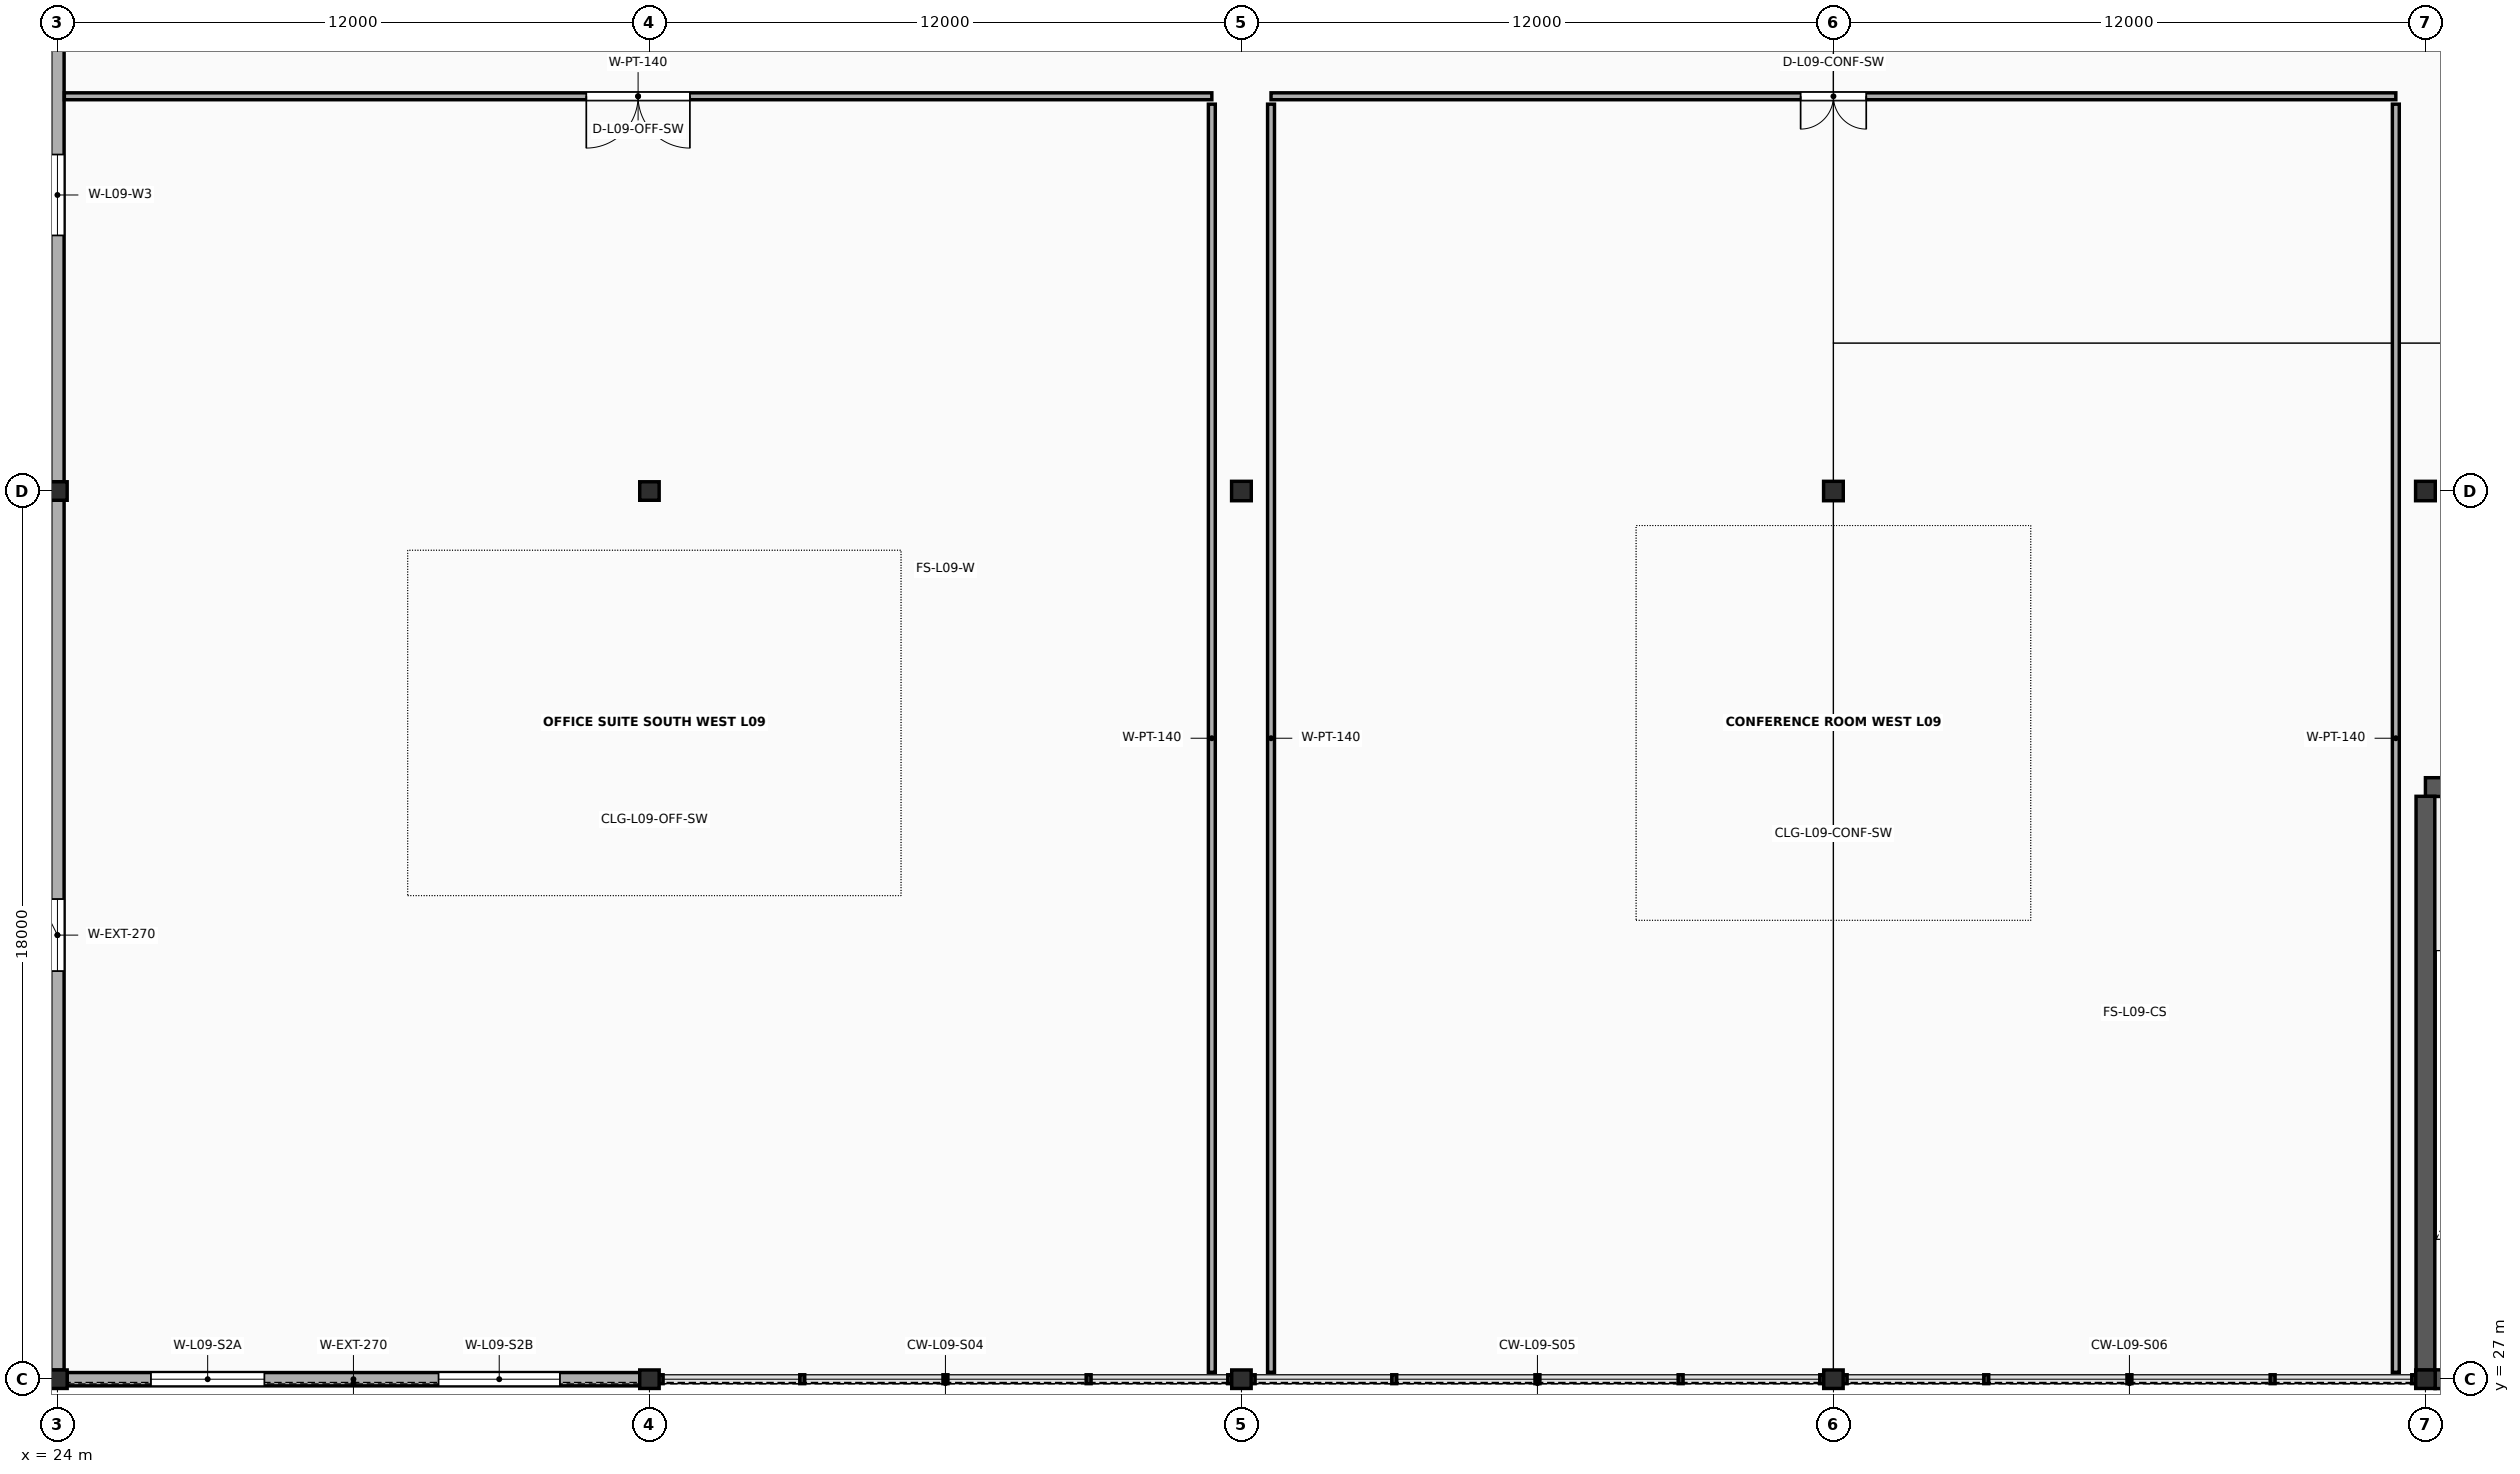
"""IFC4 building model, lengths in metres.
Left out: names, types, materials, properties, quantities, classifications, styles, units other than length and angle.
Written with IfcOpenShell. Run it as: python <this file> out.ifc"""

import sys

from ifc_helpers import new_model, si_unit, direction, frame, frame_2d, origin, origin_2d, place, context, subcontext, project, spatial, rectangle, i_section, extrude, element, fill, save


model = new_model("IFC4")
c1 = context("Model", 3, precision=1e-05, world=origin(), true_north=direction((0.0, 1.0)))
c2 = subcontext(c1, "Body", "Model", "MODEL_VIEW")
j1 = project(units=[si_unit("LENGTHUNIT", "METRE"), si_unit("PLANEANGLEUNIT", "RADIAN")], contexts=[c1])
p1 = place(None, origin())
s1 = spatial("IfcSite", under=j1, at=p1, CompositionType="ELEMENT")
p2 = place(p1, origin())
s2 = spatial("IfcBuilding", under=s1, at=p2, CompositionType="ELEMENT")
p3 = place(p2, frame((0.0, 0.0, 37.6)))
s3 = spatial("IfcBuildingStorey", under=s2, at=p3, CompositionType="ELEMENT", Elevation=37.6)
for number, where, z_axis, x_axis in (
    (1, (24.0, 27.0, 0.0), (0.0, 0.0, 1.0), (1.0, 0.0, 0.0)),
    (2, (24.0, 45.0, 0.0), (0.0, 0.0, 1.0), (1.0, 0.0, 0.0)),
    (3, (36.0, 27.0, 0.0), (0.0, 0.0, 1.0), (1.0, 0.0, 0.0)),
    (4, (36.0, 45.0, 0.0), (0.0, 0.0, 1.0), (1.0, 0.0, 0.0)),
    (5, (48.0, 27.0, 0.0), (0.0, 0.0, 1.0), (1.0, 0.0, 0.0)),
):
    element("IfcColumn", number, at=place(p3, frame(where, z_axis=z_axis, x_axis=x_axis)), inside=s3, PredefinedType="COLUMN", context=c2, shape_type="SweptSolid", body=[
        extrude(i_section(OverallWidth=0.394, OverallDepth=0.375, WebThickness=0.017, FlangeThickness=0.028, FilletRadius=0.018, at=origin_2d()), origin(), (0.0, 0.0, 1.0), 4.0),
    ])
p4 = place(p3, frame((48.0, 45.0, 0.0), z_axis=(0.0, 0.0, 1.0), x_axis=(1.0, 0.0, 0.0)))
e6 = element("IfcColumn", 6, at=p4, inside=s3, PredefinedType="COLUMN", context=c2, shape_type="SweptSolid", body=[
    extrude(i_section(OverallWidth=0.399, OverallDepth=0.393, WebThickness=0.023, FlangeThickness=0.037, FilletRadius=0.018, at=origin_2d()), origin(), (0.0, 0.0, 1.0), 4.0),
])
p5 = place(p3, frame((60.0, 27.0, 0.0), z_axis=(0.0, 0.0, 1.0), x_axis=(1.0, 0.0, 0.0)))
e7 = element("IfcColumn", 7, at=p5, inside=s3, PredefinedType="COLUMN", context=c2, shape_type="SweptSolid", body=[
    extrude(i_section(OverallWidth=0.394, OverallDepth=0.375, WebThickness=0.017, FlangeThickness=0.028, FilletRadius=0.018, at=origin_2d()), origin(), (0.0, 0.0, 1.0), 4.0),
])
p6 = place(p3, frame((60.0, 45.0, 0.0), z_axis=(0.0, 0.0, 1.0), x_axis=(1.0, 0.0, 0.0)))
e8 = element("IfcColumn", 8, at=p6, inside=s3, PredefinedType="COLUMN", context=c2, shape_type="SweptSolid", body=[
    extrude(i_section(OverallWidth=0.399, OverallDepth=0.393, WebThickness=0.023, FlangeThickness=0.037, FilletRadius=0.018, at=origin_2d()), origin(), (0.0, 0.0, 1.0), 4.0),
])
p7 = place(p3, frame((72.0, 27.0, 0.0), z_axis=(0.0, 0.0, 1.0), x_axis=(1.0, 0.0, 0.0)))
e9 = element("IfcColumn", 9, at=p7, inside=s3, PredefinedType="COLUMN", context=c2, shape_type="SweptSolid", body=[
    extrude(i_section(OverallWidth=0.394, OverallDepth=0.375, WebThickness=0.017, FlangeThickness=0.028, FilletRadius=0.018, at=origin_2d()), origin(), (0.0, 0.0, 1.0), 4.0),
])
p8 = place(p3, frame((72.0, 45.0, 0.0), z_axis=(0.0, 0.0, 1.0), x_axis=(1.0, 0.0, 0.0)))
e10 = element("IfcColumn", 10, at=p8, inside=s3, PredefinedType="COLUMN", context=c2, shape_type="SweptSolid", body=[
    extrude(i_section(OverallWidth=0.399, OverallDepth=0.393, WebThickness=0.023, FlangeThickness=0.037, FilletRadius=0.018, at=origin_2d()), origin(), (0.0, 0.0, 1.0), 4.0),
])
p9 = place(p3, frame((72.194, 27.0, 0.0), z_axis=(0.0, 0.0, 1.0), x_axis=(1.0, 0.0, 0.0)))
e11 = element("IfcWall", 11, at=p9, inside=s3, PredefinedType="SHEAR", context=c2, shape_type="SweptSolid", body=[
    extrude(rectangle(XDim=11.612, YDim=0.38, at=frame_2d((5.806, 0.0))), origin(), (0.0, 0.0, 1.0), 3.838),
])
p10 = place(p3, frame((72.0, 39.0, 0.0), z_axis=(0.0, 0.0, 1.0), x_axis=(1.0, 0.0, 0.0)))
e12 = element("IfcWall", 12, at=p10, inside=s3, PredefinedType="SHEAR", context=c2, shape_type="SweptSolid", body=[
    extrude(rectangle(XDim=12.0, YDim=0.38, at=frame_2d((6.0, 0.0))), origin(), (0.0, 0.0, 1.0), 3.838),
])
p11 = place(p10, frame((7.45, 0.0, 0.0)))
e13 = element("IfcOpeningElement", 13, at=p11, cuts=e12, PredefinedType="OPENING", context=c2, shape_type="SweptSolid", body=[
    extrude(rectangle(XDim=1.5, YDim=2.25, at=frame_2d((0.75, 1.125))), frame((0.0, 0.205, 0.0), z_axis=(0.0, -1.0, 0.0), x_axis=(1.0, 0.0, 0.0)), (0.0, 0.0, 1.0), 0.41),
])
p12 = place(p3, frame((72.0, 27.185, 0.0), z_axis=(0.0, 0.0, 1.0), x_axis=(0.0, 1.0, 0.0)))
e14 = element("IfcWall", 14, at=p12, inside=s3, PredefinedType="SHEAR", context=c2, shape_type="SweptSolid", body=[
    extrude(rectangle(XDim=11.628, YDim=0.38, at=frame_2d((5.814, 0.0))), origin(), (0.0, 0.0, 1.0), 3.838),
])
p13 = place(p3, frame((24.195, 27.0, 0.0), z_axis=(0.0, 0.0, 1.0), x_axis=(1.0, 0.0, 0.0)))
e15 = element("IfcWall", 15, at=p13, inside=s3, PredefinedType="SOLIDWALL", context=c2, shape_type="SweptSolid", body=[
    extrude(rectangle(XDim=11.61, YDim=0.27, at=frame_2d((5.805, 0.0))), origin(), (0.0, 0.0, 1.0), 3.291),
])
p14 = place(p13, frame((1.7, 0.0, 0.78)))
e16 = element("IfcOpeningElement", 16, at=p14, cuts=e15, PredefinedType="OPENING", context=c2, shape_type="SweptSolid", body=[
    extrude(rectangle(XDim=2.3, YDim=1.58, at=frame_2d((1.15, 0.79))), frame((0.0, 0.15, 0.0), z_axis=(0.0, -1.0, 0.0), x_axis=(1.0, 0.0, 0.0)), (0.0, 0.0, 1.0), 0.3),
])
p15 = place(p13, frame((7.53, 0.0, 0.78)))
e17 = element("IfcOpeningElement", 17, at=p15, cuts=e15, PredefinedType="OPENING", context=c2, shape_type="SweptSolid", body=[
    extrude(rectangle(XDim=2.46, YDim=1.58, at=frame_2d((1.23, 0.79))), frame((0.0, 0.15, 0.0), z_axis=(0.0, -1.0, 0.0), x_axis=(1.0, 0.0, 0.0)), (0.0, 0.0, 1.0), 0.3),
])
p16 = place(p3, frame((24.0, 27.186, 0.0), z_axis=(0.0, 0.0, 1.0), x_axis=(0.0, 1.0, 0.0)))
e18 = element("IfcWall", 18, at=p16, inside=s3, PredefinedType="SOLIDWALL", context=c2, shape_type="SweptSolid", body=[
    extrude(rectangle(XDim=17.629, YDim=0.27, at=frame_2d((8.814, 0.0))), origin(), (0.0, 0.0, 1.0), 3.291),
])
p17 = place(p16, frame((8.085, 0.0, 0.78)))
e19 = element("IfcOpeningElement", 19, at=p17, cuts=e18, PredefinedType="OPENING", context=c2, shape_type="SweptSolid", body=[
    extrude(rectangle(XDim=1.46, YDim=1.74, at=frame_2d((0.73, 0.87))), frame((0.0, 0.15, 0.0), z_axis=(0.0, -1.0, 0.0), x_axis=(1.0, 0.0, 0.0)), (0.0, 0.0, 1.0), 0.3),
])
p18 = place(p3, frame((24.0, 45.186, 0.0), z_axis=(0.0, 0.0, 1.0), x_axis=(0.0, 1.0, 0.0)))
e20 = element("IfcWall", 20, at=p18, inside=s3, PredefinedType="SOLIDWALL", context=c2, shape_type="SweptSolid", body=[
    extrude(rectangle(XDim=11.629, YDim=0.27, at=frame_2d((5.814, 0.0))), origin(), (0.0, 0.0, 1.0), 3.291),
])
p19 = place(p18, frame((4.994, 0.0, 0.78)))
e21 = element("IfcOpeningElement", 21, at=p19, cuts=e20, PredefinedType="OPENING", context=c2, shape_type="SweptSolid", body=[
    extrude(rectangle(XDim=1.64, YDim=1.74, at=frame_2d((0.82, 0.87))), frame((0.0, 0.15, 0.0), z_axis=(0.0, -1.0, 0.0), x_axis=(1.0, 0.0, 0.0)), (0.0, 0.0, 1.0), 0.3),
])
p20 = place(p3, frame((24.14, 53.0, 0.0), z_axis=(0.0, 0.0, 1.0), x_axis=(1.0, 0.0, 0.0)))
e22 = element("IfcWall", 22, at=p20, inside=s3, PredefinedType="PARTITIONING", context=c2, shape_type="SweptSolid", body=[
    extrude(rectangle(XDim=23.26, YDim=0.14, at=frame_2d((11.63, 0.0))), origin(), (0.0, 0.0, 1.0), 2.88),
])
p21 = place(p20, frame((10.58, 0.0, 0.0)))
e23 = element("IfcOpeningElement", 23, at=p21, cuts=e22, PredefinedType="OPENING", context=c2, shape_type="SweptSolid", body=[
    extrude(rectangle(XDim=2.1, YDim=2.47, at=frame_2d((1.05, 1.235))), frame((0.0, 0.085, 0.0), z_axis=(0.0, -1.0, 0.0), x_axis=(1.0, 0.0, 0.0)), (0.0, 0.0, 1.0), 0.17),
])
p22 = place(p3, frame((47.4, 27.14, 0.0), z_axis=(0.0, 0.0, 1.0), x_axis=(0.0, 1.0, 0.0)))
e24 = element("IfcWall", 24, at=p22, inside=s3, PredefinedType="PARTITIONING", context=c2, shape_type="SweptSolid", body=[
    extrude(rectangle(XDim=25.7, YDim=0.14, at=frame_2d((12.85, 0.0))), origin(), (0.0, 0.0, 1.0), 2.88),
])
p23 = place(p3, frame((48.6, 53.0, 0.0), z_axis=(0.0, 0.0, 1.0), x_axis=(1.0, 0.0, 0.0)))
e25 = element("IfcWall", 25, at=p23, inside=s3, PredefinedType="PARTITIONING", context=c2, shape_type="SweptSolid", body=[
    extrude(rectangle(XDim=22.8, YDim=0.14, at=frame_2d((11.4, 0.0))), origin(), (0.0, 0.0, 1.0), 2.88),
])
p24 = place(p23, frame((10.735, 0.0, 0.0)))
e26 = element("IfcOpeningElement", 26, at=p24, cuts=e25, PredefinedType="OPENING", context=c2, shape_type="SweptSolid", body=[
    extrude(rectangle(XDim=1.33, YDim=2.2, at=frame_2d((0.665, 1.1))), frame((0.0, 0.085, 0.0), z_axis=(0.0, -1.0, 0.0), x_axis=(1.0, 0.0, 0.0)), (0.0, 0.0, 1.0), 0.17),
])
for number, where, z_axis, x_axis in (
    (27, (48.6, 27.14, 0.0), (0.0, 0.0, 1.0), (0.0, 1.0, 0.0)),
    (28, (71.4, 27.14, 0.0), (0.0, 0.0, 1.0), (0.0, 1.0, 0.0)),
):
    element("IfcWall", number, at=place(p3, frame(where, z_axis=z_axis, x_axis=x_axis)), inside=s3, PredefinedType="PARTITIONING", context=c2, shape_type="SweptSolid", body=[
        extrude(rectangle(XDim=25.7, YDim=0.14, at=frame_2d((12.85, 0.0))), origin(), (0.0, 0.0, 1.0), 2.88),
    ])
p25 = place(p14, origin())
e29 = element("IfcWindow", 29, at=p25, inside=s3, PartitioningType="DOUBLE_PANEL_VERTICAL", PredefinedType="WINDOW", context=c2, shape_type="SweptSolid", body=[
    extrude(rectangle(XDim=2.3, YDim=1.58, at=frame_2d((1.15, 0.79))), frame((0.0, 0.03, 0.0), z_axis=(0.0, -1.0, 0.0), x_axis=(1.0, 0.0, 0.0)), (0.0, 0.0, 1.0), 0.06),
])
fill(e16, e29)
p26 = place(p15, origin())
e30 = element("IfcWindow", 30, at=p26, inside=s3, PartitioningType="DOUBLE_PANEL_VERTICAL", PredefinedType="WINDOW", context=c2, shape_type="SweptSolid", body=[
    extrude(rectangle(XDim=2.46, YDim=1.58, at=frame_2d((1.23, 0.79))), frame((0.0, 0.03, 0.0), z_axis=(0.0, -1.0, 0.0), x_axis=(1.0, 0.0, 0.0)), (0.0, 0.0, 1.0), 0.06),
])
fill(e17, e30)
p27 = place(p17, origin())
e31 = element("IfcWindow", 31, at=p27, inside=s3, PartitioningType="SINGLE_PANEL", PredefinedType="WINDOW", context=c2, shape_type="SweptSolid", body=[
    extrude(rectangle(XDim=1.46, YDim=1.74, at=frame_2d((0.73, 0.87))), frame((0.0, 0.03, 0.0), z_axis=(0.0, -1.0, 0.0), x_axis=(1.0, 0.0, 0.0)), (0.0, 0.0, 1.0), 0.06),
])
fill(e19, e31)
p28 = place(p19, origin())
e32 = element("IfcWindow", 32, at=p28, inside=s3, PartitioningType="SINGLE_PANEL", PredefinedType="WINDOW", context=c2, shape_type="SweptSolid", body=[
    extrude(rectangle(XDim=1.64, YDim=1.74, at=frame_2d((0.82, 0.87))), frame((0.0, 0.03, 0.0), z_axis=(0.0, -1.0, 0.0), x_axis=(1.0, 0.0, 0.0)), (0.0, 0.0, 1.0), 0.06),
])
fill(e21, e32)
p29 = place(p21, origin())
e33 = element("IfcDoor", 33, at=p29, inside=s3, OperationType="DOUBLE_DOOR_SINGLE_SWING", PredefinedType="DOOR", context=c2, shape_type="SweptSolid", body=[
    extrude(rectangle(XDim=2.1, YDim=2.47, at=frame_2d((1.05, 1.235))), frame((0.0, 0.025, 0.0), z_axis=(0.0, -1.0, 0.0), x_axis=(1.0, 0.0, 0.0)), (0.0, 0.0, 1.0), 0.05),
])
fill(e23, e33)
p30 = place(p24, origin())
e34 = element("IfcDoor", 34, at=p30, inside=s3, OperationType="DOUBLE_DOOR_SINGLE_SWING", PredefinedType="DOOR", context=c2, shape_type="SweptSolid", body=[
    extrude(rectangle(XDim=1.33, YDim=2.2, at=frame_2d((0.665, 1.1))), frame((0.0, 0.025, 0.0), z_axis=(0.0, -1.0, 0.0), x_axis=(1.0, 0.0, 0.0)), (0.0, 0.0, 1.0), 0.05),
])
fill(e26, e34)
save(model, sys.argv[1])
